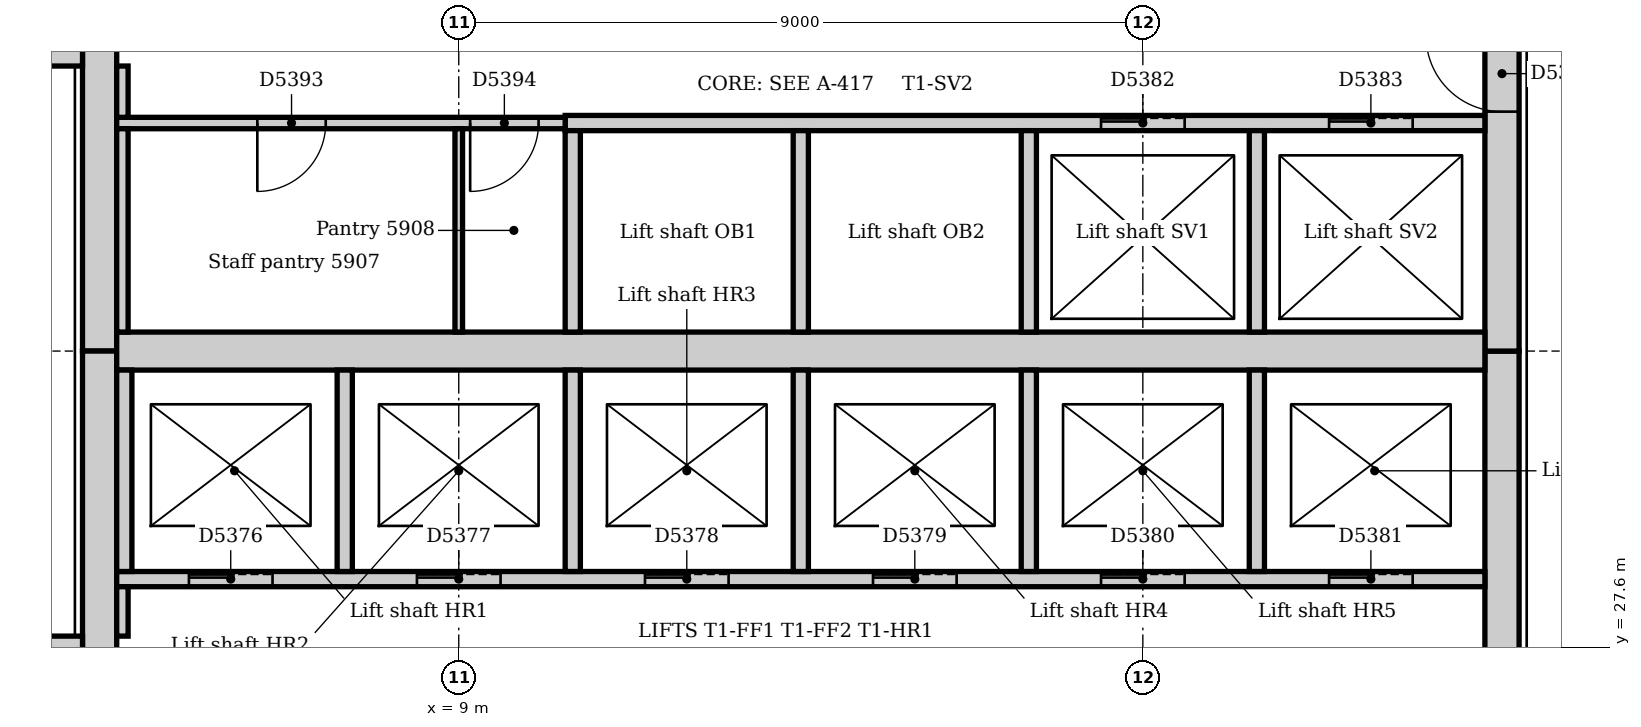
"""IFC4 building model, lengths in metres.
Left out: names, types, materials, properties, quantities, classifications, styles, units other than length and angle.
Written with IfcOpenShell. Run it as: python <this file> out.ifc"""

import sys

from ifc_helpers import new_model, si_unit, direction, frame, frame_2d, origin, place, context, subcontext, project, spatial, rectangle, extrude, element, fill, save


model = new_model("IFC4")
c1 = context("Model", 3, precision=1e-05, world=origin(), true_north=direction((0.0, 1.0)))
c2 = subcontext(c1, "Body", "Model", "MODEL_VIEW")
j1 = project(units=[si_unit("LENGTHUNIT", "METRE"), si_unit("PLANEANGLEUNIT", "RADIAN")], contexts=[c1])
p1 = place(None, origin())
s1 = spatial("IfcSite", under=j1, at=p1, CompositionType="ELEMENT")
p2 = place(p1, origin())
s2 = spatial("IfcBuilding", under=s1, at=p2, CompositionType="ELEMENT")
p3 = place(p2, frame((0.0, 0.0, 247.0)))
s3 = spatial("IfcBuildingStorey", under=s2, at=p3, CompositionType="ELEMENT", Elevation=247.0)
p4 = place(p3, frame((22.725, 21.0, 0.0), z_axis=(0.0, 0.0, 1.0), x_axis=(0.0, 1.0, 0.0)))
e1 = element("IfcWall", 1, at=p4, inside=s3, PredefinedType="SOLIDWALL", context=c2, shape_type="SweptSolid", body=[
    extrude(rectangle(XDim=10.5, YDim=0.45, at=frame_2d((5.25, 0.0))), origin(), (0.0, 0.0, 1.0), 4.0),
])
p5 = place(p4, frame((4.35, 0.0, 0.0)))
e2 = element("IfcOpeningElement", 2, at=p5, cuts=e1, PredefinedType="OPENING", context=c2, shape_type="SweptSolid", body=[
    extrude(rectangle(XDim=1.8, YDim=2.1, at=frame_2d((0.9, 1.05))), frame((0.0, 0.235, 0.0), z_axis=(0.0, -1.0, 0.0), x_axis=(1.0, 0.0, 0.0)), (0.0, 0.0, 1.0), 0.47),
])
p6 = place(p3, frame((22.725, 31.5, 0.0), z_axis=(0.0, 0.0, 1.0), x_axis=(0.0, 1.0, 0.0)))
e3 = element("IfcWall", 3, at=p6, inside=s3, PredefinedType="SOLIDWALL", context=c2, shape_type="SweptSolid", body=[
    extrude(rectangle(XDim=10.5, YDim=0.45, at=frame_2d((5.25, 0.0))), origin(), (0.0, 0.0, 1.0), 4.0),
])
p7 = place(p6, frame((3.15, 0.0, 0.0)))
e4 = element("IfcOpeningElement", 4, at=p7, cuts=e3, PredefinedType="OPENING", context=c2, shape_type="SweptSolid", body=[
    extrude(rectangle(XDim=1.0, YDim=2.1, at=frame_2d((0.5, 1.05))), frame((0.0, 0.235, 0.0), z_axis=(0.0, -1.0, 0.0), x_axis=(1.0, 0.0, 0.0)), (0.0, 0.0, 1.0), 0.47),
])
p8 = place(p6, frame((5.2, 0.0, 0.0)))
e5 = element("IfcOpeningElement", 5, at=p8, cuts=e3, PredefinedType="OPENING", context=c2, shape_type="SweptSolid", body=[
    extrude(rectangle(XDim=1.0, YDim=2.1, at=frame_2d((0.5, 1.05))), frame((0.0, 0.235, 0.0), z_axis=(0.0, -1.0, 0.0), x_axis=(1.0, 0.0, 0.0)), (0.0, 0.0, 1.0), 0.47),
])
p9 = place(p3, frame((4.275, 42.0, 0.0), z_axis=(0.0, 0.0, 1.0), x_axis=(0.0, -1.0, 0.0)))
e6 = element("IfcWall", 6, at=p9, inside=s3, PredefinedType="SOLIDWALL", context=c2, shape_type="SweptSolid", body=[
    extrude(rectangle(XDim=10.5, YDim=0.45, at=frame_2d((5.25, 0.0))), origin(), (0.0, 0.0, 1.0), 4.0),
])
p10 = place(p9, frame((5.3, 0.0, 0.0)))
e7 = element("IfcOpeningElement", 7, at=p10, cuts=e6, PredefinedType="OPENING", context=c2, shape_type="SweptSolid", body=[
    extrude(rectangle(XDim=1.0, YDim=2.1, at=frame_2d((0.5, 1.05))), frame((0.0, 0.235, 0.0), z_axis=(0.0, -1.0, 0.0), x_axis=(1.0, 0.0, 0.0)), (0.0, 0.0, 1.0), 0.47),
])
p11 = place(p3, frame((4.275, 31.5, 0.0), z_axis=(0.0, 0.0, 1.0), x_axis=(0.0, -1.0, 0.0)))
e8 = element("IfcWall", 8, at=p11, inside=s3, PredefinedType="SOLIDWALL", context=c2, shape_type="SweptSolid", body=[
    extrude(rectangle(XDim=10.5, YDim=0.45, at=frame_2d((5.25, 0.0))), origin(), (0.0, 0.0, 1.0), 4.0),
])
p12 = place(p11, frame((4.25, 0.0, 0.0)))
e9 = element("IfcOpeningElement", 9, at=p12, cuts=e8, PredefinedType="OPENING", context=c2, shape_type="SweptSolid", body=[
    extrude(rectangle(XDim=1.0, YDim=2.1, at=frame_2d((0.5, 1.05))), frame((0.0, 0.235, 0.0), z_axis=(0.0, -1.0, 0.0), x_axis=(1.0, 0.0, 0.0)), (0.0, 0.0, 1.0), 0.47),
])
p13 = place(p3, frame((4.5, 31.5, 0.0), z_axis=(0.0, 0.0, 1.0), x_axis=(1.0, 0.0, 0.0)))
e10 = element("IfcWall", 10, at=p13, inside=s3, PredefinedType="SOLIDWALL", context=c2, shape_type="SweptSolid", body=[
    extrude(rectangle(XDim=18.0, YDim=0.5, at=frame_2d((9.0, 0.0))), origin(), (0.0, 0.0, 1.0), 4.0),
])
p14 = place(p3, frame((4.05, 27.625, 0.0), z_axis=(0.0, 0.0, 1.0), x_axis=(-1.0, 0.0, 0.0)))
e11 = element("IfcWall", 11, at=p14, inside=s3, PredefinedType="SOLIDWALL", context=c2, shape_type="SweptSolid", body=[
    extrude(rectangle(XDim=3.69, YDim=0.25, at=frame_2d((1.845, 0.0))), origin(), (0.0, 0.0, 1.0), 4.0),
])
p15 = place(p14, frame((0.55, 0.0, 0.0)))
e12 = element("IfcOpeningElement", 12, at=p15, cuts=e11, PredefinedType="OPENING", context=c2, shape_type="SweptSolid", body=[
    extrude(rectangle(XDim=1.0, YDim=2.1, at=frame_2d((0.5, 1.05))), frame((0.0, 0.135, 0.0), z_axis=(0.0, -1.0, 0.0), x_axis=(1.0, 0.0, 0.0)), (0.0, 0.0, 1.0), 0.27),
])
p16 = place(p3, frame((0.36, 35.375, 0.0), z_axis=(0.0, 0.0, 1.0), x_axis=(1.0, 0.0, 0.0)))
e13 = element("IfcWall", 13, at=p16, inside=s3, PredefinedType="SOLIDWALL", context=c2, shape_type="SweptSolid", body=[
    extrude(rectangle(XDim=3.69, YDim=0.25, at=frame_2d((1.845, 0.0))), origin(), (0.0, 0.0, 1.0), 4.0),
])
p17 = place(p16, frame((2.14, 0.0, 0.0)))
e14 = element("IfcOpeningElement", 14, at=p17, cuts=e13, PredefinedType="OPENING", context=c2, shape_type="SweptSolid", body=[
    extrude(rectangle(XDim=1.0, YDim=2.1, at=frame_2d((0.5, 1.05))), frame((0.0, 0.135, 0.0), z_axis=(0.0, -1.0, 0.0), x_axis=(1.0, 0.0, 0.0)), (0.0, 0.0, 1.0), 0.27),
])
p18 = place(p3, frame((4.5, 28.5, 0.0), z_axis=(0.0, 0.0, 1.0), x_axis=(1.0, 0.0, 0.0)))
e15 = element("IfcWall", 15, at=p18, inside=s3, PredefinedType="PARTITIONING", context=c2, shape_type="SweptSolid", body=[
    extrude(rectangle(XDim=18.0, YDim=0.2, at=frame_2d((9.0, 0.0))), origin(), (0.0, 0.0, 1.0), 3.85),
])
p19 = place(p18, frame((0.95, 0.0, 0.0)))
e16 = element("IfcOpeningElement", 16, at=p19, cuts=e15, PredefinedType="OPENING", context=c2, shape_type="SweptSolid", body=[
    extrude(rectangle(XDim=1.1, YDim=2.1, at=frame_2d((0.55, 1.05))), frame((0.0, 0.11, 0.0), z_axis=(0.0, -1.0, 0.0), x_axis=(1.0, 0.0, 0.0)), (0.0, 0.0, 1.0), 0.22),
])
p20 = place(p18, frame((3.95, 0.0, 0.0)))
e17 = element("IfcOpeningElement", 17, at=p20, cuts=e15, PredefinedType="OPENING", context=c2, shape_type="SweptSolid", body=[
    extrude(rectangle(XDim=1.1, YDim=2.1, at=frame_2d((0.55, 1.05))), frame((0.0, 0.11, 0.0), z_axis=(0.0, -1.0, 0.0), x_axis=(1.0, 0.0, 0.0)), (0.0, 0.0, 1.0), 0.22),
])
p21 = place(p18, frame((6.95, 0.0, 0.0)))
e18 = element("IfcOpeningElement", 18, at=p21, cuts=e15, PredefinedType="OPENING", context=c2, shape_type="SweptSolid", body=[
    extrude(rectangle(XDim=1.1, YDim=2.1, at=frame_2d((0.55, 1.05))), frame((0.0, 0.11, 0.0), z_axis=(0.0, -1.0, 0.0), x_axis=(1.0, 0.0, 0.0)), (0.0, 0.0, 1.0), 0.22),
])
p22 = place(p18, frame((9.95, 0.0, 0.0)))
e19 = element("IfcOpeningElement", 19, at=p22, cuts=e15, PredefinedType="OPENING", context=c2, shape_type="SweptSolid", body=[
    extrude(rectangle(XDim=1.1, YDim=2.1, at=frame_2d((0.55, 1.05))), frame((0.0, 0.11, 0.0), z_axis=(0.0, -1.0, 0.0), x_axis=(1.0, 0.0, 0.0)), (0.0, 0.0, 1.0), 0.22),
])
p23 = place(p18, frame((12.95, 0.0, 0.0)))
e20 = element("IfcOpeningElement", 20, at=p23, cuts=e15, PredefinedType="OPENING", context=c2, shape_type="SweptSolid", body=[
    extrude(rectangle(XDim=1.1, YDim=2.1, at=frame_2d((0.55, 1.05))), frame((0.0, 0.11, 0.0), z_axis=(0.0, -1.0, 0.0), x_axis=(1.0, 0.0, 0.0)), (0.0, 0.0, 1.0), 0.22),
])
p24 = place(p18, frame((15.95, 0.0, 0.0)))
e21 = element("IfcOpeningElement", 21, at=p24, cuts=e15, PredefinedType="OPENING", context=c2, shape_type="SweptSolid", body=[
    extrude(rectangle(XDim=1.1, YDim=2.1, at=frame_2d((0.55, 1.05))), frame((0.0, 0.11, 0.0), z_axis=(0.0, -1.0, 0.0), x_axis=(1.0, 0.0, 0.0)), (0.0, 0.0, 1.0), 0.22),
])
p25 = place(p3, frame((10.4, 34.5, 0.0), z_axis=(0.0, 0.0, 1.0), x_axis=(1.0, 0.0, 0.0)))
e22 = element("IfcWall", 22, at=p25, inside=s3, PredefinedType="PARTITIONING", context=c2, shape_type="SweptSolid", body=[
    extrude(rectangle(XDim=12.1, YDim=0.2, at=frame_2d((6.05, 0.0))), origin(), (0.0, 0.0, 1.0), 3.85),
])
p26 = place(p25, frame((7.05, 0.0, 0.0)))
e23 = element("IfcOpeningElement", 23, at=p26, cuts=e22, PredefinedType="OPENING", context=c2, shape_type="SweptSolid", body=[
    extrude(rectangle(XDim=1.1, YDim=2.1, at=frame_2d((0.55, 1.05))), frame((0.0, 0.11, 0.0), z_axis=(0.0, -1.0, 0.0), x_axis=(1.0, 0.0, 0.0)), (0.0, 0.0, 1.0), 0.22),
])
p27 = place(p25, frame((10.05, 0.0, 0.0)))
e24 = element("IfcOpeningElement", 24, at=p27, cuts=e22, PredefinedType="OPENING", context=c2, shape_type="SweptSolid", body=[
    extrude(rectangle(XDim=1.1, YDim=2.1, at=frame_2d((0.55, 1.05))), frame((0.0, 0.11, 0.0), z_axis=(0.0, -1.0, 0.0), x_axis=(1.0, 0.0, 0.0)), (0.0, 0.0, 1.0), 0.22),
])
for number, where, z_axis, x_axis in (
    (25, (10.5, 28.6, 0.0), (0.0, 0.0, 1.0), (0.0, 1.0, 0.0)),
    (26, (10.5, 31.75, 0.0), (0.0, 0.0, 1.0), (0.0, 1.0, 0.0)),
    (27, (13.5, 28.6, 0.0), (0.0, 0.0, 1.0), (0.0, 1.0, 0.0)),
    (28, (13.5, 31.75, 0.0), (0.0, 0.0, 1.0), (0.0, 1.0, 0.0)),
    (29, (16.5, 28.6, 0.0), (0.0, 0.0, 1.0), (0.0, 1.0, 0.0)),
    (30, (16.5, 31.75, 0.0), (0.0, 0.0, 1.0), (0.0, 1.0, 0.0)),
    (31, (19.5, 28.6, 0.0), (0.0, 0.0, 1.0), (0.0, 1.0, 0.0)),
    (32, (19.5, 31.75, 0.0), (0.0, 0.0, 1.0), (0.0, 1.0, 0.0)),
    (33, (4.6, 28.6, 0.0), (0.0, 0.0, 1.0), (0.0, 1.0, 0.0)),
    (34, (7.5, 28.6, 0.0), (0.0, 0.0, 1.0), (0.0, 1.0, 0.0)),
):
    element("IfcWall", number, at=place(p3, frame(where, z_axis=z_axis, x_axis=x_axis)), inside=s3, PredefinedType="PARTITIONING", context=c2, shape_type="SweptSolid", body=[
        extrude(rectangle(XDim=2.65, YDim=0.2, at=frame_2d((1.325, 0.0))), origin(), (0.0, 0.0, 1.0), 3.85),
    ])
p28 = place(p3, frame((4.5, 34.5, 0.0), z_axis=(0.0, 0.0, 1.0), x_axis=(1.0, 0.0, 0.0)))
e35 = element("IfcWall", 35, at=p28, inside=s3, PredefinedType="PARTITIONING", context=c2, shape_type="SweptSolid", body=[
    extrude(rectangle(XDim=5.9, YDim=0.15, at=frame_2d((2.95, 0.0))), origin(), (0.0, 0.0, 1.0), 3.85),
])
p29 = place(p28, frame((1.85, 0.0, 0.0)))
e36 = element("IfcOpeningElement", 36, at=p29, cuts=e35, PredefinedType="OPENING", context=c2, shape_type="SweptSolid", body=[
    extrude(rectangle(XDim=0.9, YDim=2.1, at=frame_2d((0.45, 1.05))), frame((0.0, 0.085, 0.0), z_axis=(0.0, -1.0, 0.0), x_axis=(1.0, 0.0, 0.0)), (0.0, 0.0, 1.0), 0.17),
])
p30 = place(p28, frame((4.65, 0.0, 0.0)))
e37 = element("IfcOpeningElement", 37, at=p30, cuts=e35, PredefinedType="OPENING", context=c2, shape_type="SweptSolid", body=[
    extrude(rectangle(XDim=0.9, YDim=2.1, at=frame_2d((0.45, 1.05))), frame((0.0, 0.085, 0.0), z_axis=(0.0, -1.0, 0.0), x_axis=(1.0, 0.0, 0.0)), (0.0, 0.0, 1.0), 0.17),
])
p31 = place(p3, frame((4.575, 34.575, 0.0), z_axis=(0.0, 0.0, 1.0), x_axis=(0.0, 1.0, 0.0)))
e38 = element("IfcWall", 38, at=p31, inside=s3, PredefinedType="PARTITIONING", context=c2, shape_type="SweptSolid", body=[
    extrude(rectangle(XDim=0.675, YDim=0.15, at=frame_2d((0.338, 0.0))), origin(), (0.0, 0.0, 1.0), 3.85),
])
p32 = place(p3, frame((4.575, 31.75, 0.0), z_axis=(0.0, 0.0, 1.0), x_axis=(0.0, 1.0, 0.0)))
e39 = element("IfcWall", 39, at=p32, inside=s3, PredefinedType="PARTITIONING", context=c2, shape_type="SweptSolid", body=[
    extrude(rectangle(XDim=2.675, YDim=0.15, at=frame_2d((1.337, 0.0))), origin(), (0.0, 0.0, 1.0), 3.85),
])
p33 = place(p3, frame((4.575, 27.75, 0.0), z_axis=(0.0, 0.0, 1.0), x_axis=(0.0, 1.0, 0.0)))
e40 = element("IfcWall", 40, at=p33, inside=s3, PredefinedType="PARTITIONING", context=c2, shape_type="SweptSolid", body=[
    extrude(rectangle(XDim=0.65, YDim=0.15, at=frame_2d((0.325, 0.0))), origin(), (0.0, 0.0, 1.0), 3.85),
])
p34 = place(p3, frame((9.0, 31.75, 0.0), z_axis=(0.0, 0.0, 1.0), x_axis=(0.0, 1.0, 0.0)))
e41 = element("IfcWall", 41, at=p34, inside=s3, PredefinedType="PARTITIONING", context=c2, shape_type="SweptSolid", body=[
    extrude(rectangle(XDim=2.675, YDim=0.1, at=frame_2d((1.337, 0.0))), origin(), (0.0, 0.0, 1.0), 3.85),
])
p35 = place(p19, origin())
e42 = element("IfcDoor", 42, at=p35, inside=s3, OperationType="SLIDING_TO_LEFT", PredefinedType="DOOR", context=c2, shape_type="SweptSolid", body=[
    extrude(rectangle(XDim=1.1, YDim=2.1, at=frame_2d((0.55, 1.05))), frame((0.0, 0.025, 0.0), z_axis=(0.0, -1.0, 0.0), x_axis=(1.0, 0.0, 0.0)), (0.0, 0.0, 1.0), 0.05),
])
fill(e16, e42)
p36 = place(p20, origin())
e43 = element("IfcDoor", 43, at=p36, inside=s3, OperationType="SLIDING_TO_LEFT", PredefinedType="DOOR", context=c2, shape_type="SweptSolid", body=[
    extrude(rectangle(XDim=1.1, YDim=2.1, at=frame_2d((0.55, 1.05))), frame((0.0, 0.025, 0.0), z_axis=(0.0, -1.0, 0.0), x_axis=(1.0, 0.0, 0.0)), (0.0, 0.0, 1.0), 0.05),
])
fill(e17, e43)
p37 = place(p21, origin())
e44 = element("IfcDoor", 44, at=p37, inside=s3, OperationType="SLIDING_TO_LEFT", PredefinedType="DOOR", context=c2, shape_type="SweptSolid", body=[
    extrude(rectangle(XDim=1.1, YDim=2.1, at=frame_2d((0.55, 1.05))), frame((0.0, 0.025, 0.0), z_axis=(0.0, -1.0, 0.0), x_axis=(1.0, 0.0, 0.0)), (0.0, 0.0, 1.0), 0.05),
])
fill(e18, e44)
p38 = place(p22, origin())
e45 = element("IfcDoor", 45, at=p38, inside=s3, OperationType="SLIDING_TO_LEFT", PredefinedType="DOOR", context=c2, shape_type="SweptSolid", body=[
    extrude(rectangle(XDim=1.1, YDim=2.1, at=frame_2d((0.55, 1.05))), frame((0.0, 0.025, 0.0), z_axis=(0.0, -1.0, 0.0), x_axis=(1.0, 0.0, 0.0)), (0.0, 0.0, 1.0), 0.05),
])
fill(e19, e45)
p39 = place(p23, origin())
e46 = element("IfcDoor", 46, at=p39, inside=s3, OperationType="SLIDING_TO_LEFT", PredefinedType="DOOR", context=c2, shape_type="SweptSolid", body=[
    extrude(rectangle(XDim=1.1, YDim=2.1, at=frame_2d((0.55, 1.05))), frame((0.0, 0.025, 0.0), z_axis=(0.0, -1.0, 0.0), x_axis=(1.0, 0.0, 0.0)), (0.0, 0.0, 1.0), 0.05),
])
fill(e20, e46)
p40 = place(p24, origin())
e47 = element("IfcDoor", 47, at=p40, inside=s3, OperationType="SLIDING_TO_LEFT", PredefinedType="DOOR", context=c2, shape_type="SweptSolid", body=[
    extrude(rectangle(XDim=1.1, YDim=2.1, at=frame_2d((0.55, 1.05))), frame((0.0, 0.025, 0.0), z_axis=(0.0, -1.0, 0.0), x_axis=(1.0, 0.0, 0.0)), (0.0, 0.0, 1.0), 0.05),
])
fill(e21, e47)
p41 = place(p26, origin())
e48 = element("IfcDoor", 48, at=p41, inside=s3, OperationType="SLIDING_TO_LEFT", PredefinedType="DOOR", context=c2, shape_type="SweptSolid", body=[
    extrude(rectangle(XDim=1.1, YDim=2.1, at=frame_2d((0.55, 1.05))), frame((0.0, 0.025, 0.0), z_axis=(0.0, -1.0, 0.0), x_axis=(1.0, 0.0, 0.0)), (0.0, 0.0, 1.0), 0.05),
])
fill(e23, e48)
p42 = place(p27, origin())
e49 = element("IfcDoor", 49, at=p42, inside=s3, OperationType="SLIDING_TO_LEFT", PredefinedType="DOOR", context=c2, shape_type="SweptSolid", body=[
    extrude(rectangle(XDim=1.1, YDim=2.1, at=frame_2d((0.55, 1.05))), frame((0.0, 0.025, 0.0), z_axis=(0.0, -1.0, 0.0), x_axis=(1.0, 0.0, 0.0)), (0.0, 0.0, 1.0), 0.05),
])
fill(e24, e49)
p43 = place(p7, origin())
e50 = element("IfcDoor", 50, at=p43, inside=s3, OperationType="SINGLE_SWING_RIGHT", PredefinedType="DOOR", context=c2, shape_type="SweptSolid", body=[
    extrude(rectangle(XDim=1.0, YDim=2.1, at=frame_2d((0.5, 1.05))), frame((0.0, 0.025, 0.0), z_axis=(0.0, -1.0, 0.0), x_axis=(1.0, 0.0, 0.0)), (0.0, 0.0, 1.0), 0.05),
])
fill(e4, e50)
p44 = place(p29, frame((0.9, 0.0, 0.0), z_axis=(0.0, 0.0, 1.0), x_axis=(-1.0, 0.0, 0.0)))
e51 = element("IfcDoor", 51, at=p44, inside=s3, OperationType="SINGLE_SWING_RIGHT", PredefinedType="DOOR", context=c2, shape_type="SweptSolid", body=[
    extrude(rectangle(XDim=0.9, YDim=2.1, at=frame_2d((0.45, 1.05))), frame((0.0, 0.025, 0.0), z_axis=(0.0, -1.0, 0.0), x_axis=(1.0, 0.0, 0.0)), (0.0, 0.0, 1.0), 0.05),
])
fill(e36, e51)
p45 = place(p30, frame((0.9, 0.0, 0.0), z_axis=(0.0, 0.0, 1.0), x_axis=(-1.0, 0.0, 0.0)))
e52 = element("IfcDoor", 52, at=p45, inside=s3, OperationType="SINGLE_SWING_RIGHT", PredefinedType="DOOR", context=c2, shape_type="SweptSolid", body=[
    extrude(rectangle(XDim=0.9, YDim=2.1, at=frame_2d((0.45, 1.05))), frame((0.0, 0.025, 0.0), z_axis=(0.0, -1.0, 0.0), x_axis=(1.0, 0.0, 0.0)), (0.0, 0.0, 1.0), 0.05),
])
fill(e37, e52)
save(model, sys.argv[1])
